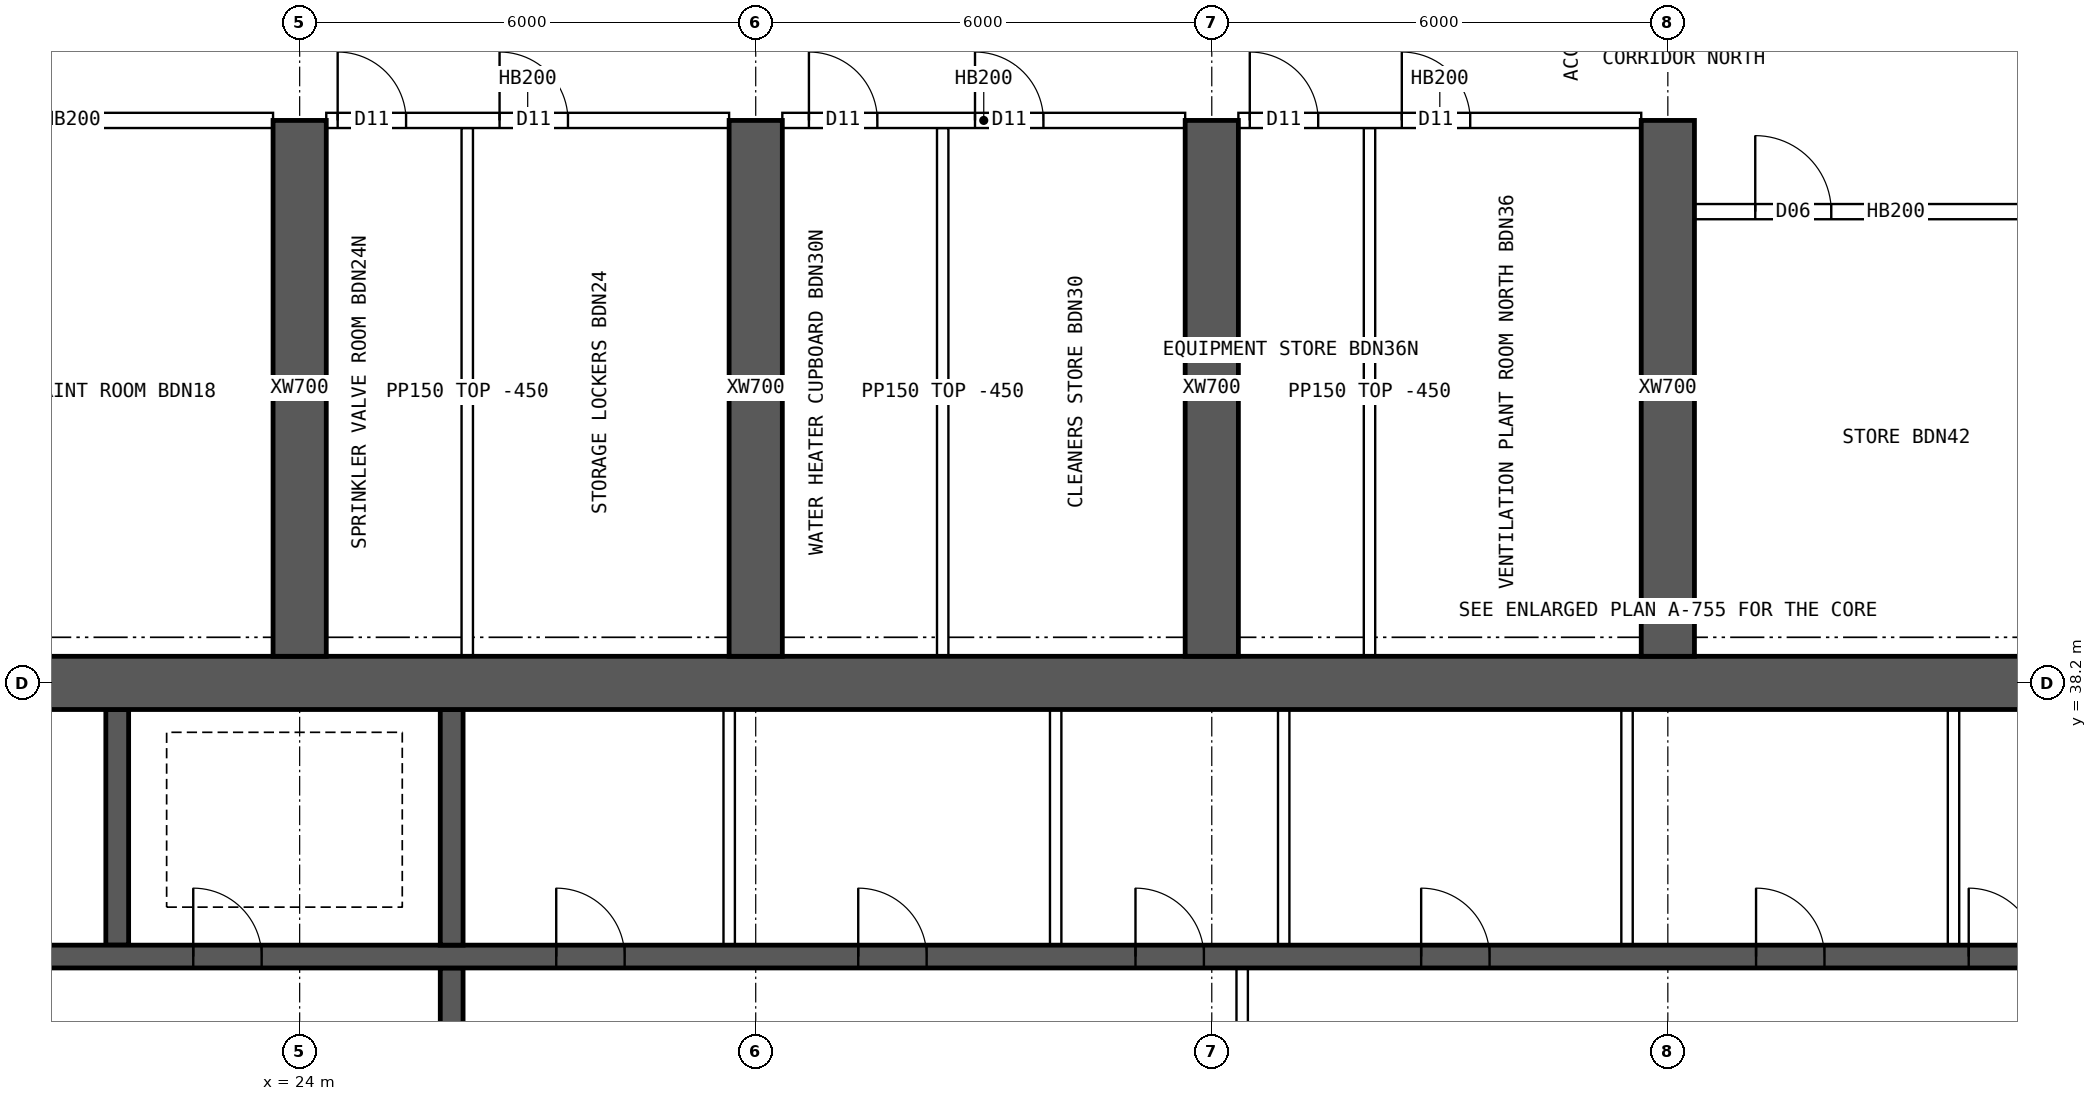
"""IFC4 building model, lengths in metres.
Left out: names, types, materials, properties, quantities, classifications, styles, units other than length and angle.
Written with IfcOpenShell. Run it as: python <this file> out.ifc"""

import sys

from ifc_helpers import new_model, si_unit, direction, frame, frame_2d, origin, place, context, subcontext, project, spatial, rectangle, extrude, element, fill, save


model = new_model("IFC4")
c1 = context("Model", 3, precision=1e-05, world=origin(), true_north=direction((0.0, 1.0)))
c2 = subcontext(c1, "Body", "Model", "MODEL_VIEW")
j1 = project(units=[si_unit("LENGTHUNIT", "METRE"), si_unit("PLANEANGLEUNIT", "RADIAN")], contexts=[c1])
p1 = place(None, origin())
s1 = spatial("IfcSite", under=j1, at=p1, CompositionType="ELEMENT")
p2 = place(p1, origin())
s2 = spatial("IfcBuilding", under=s1, at=p2, CompositionType="ELEMENT")
p3 = place(p2, frame((0.0, 0.0, 212.8)))
s3 = spatial("IfcBuildingStorey", under=s2, at=p3, CompositionType="ELEMENT", Elevation=212.8)
p4 = place(p3, frame((18.0, 38.2, 0.0), z_axis=(0.0, 0.0, 1.0), x_axis=(1.0, 0.0, 0.0)))
e1 = element("IfcWall", 1, at=p4, inside=s3, PredefinedType="SHEAR", context=c2, shape_type="SweptSolid", body=[
    extrude(rectangle(XDim=48.0, YDim=0.7, at=frame_2d((24.0, 0.0))), origin(), (0.0, 0.0, 1.0), 3.75),
])
p5 = place(p3, frame((18.35, 34.6, 0.0), z_axis=(0.0, 0.0, 1.0), x_axis=(1.0, 0.0, 0.0)))
e2 = element("IfcWall", 2, at=p5, inside=s3, PredefinedType="SHEAR", context=c2, shape_type="SweptSolid", body=[
    extrude(rectangle(XDim=47.3, YDim=0.3, at=frame_2d((23.65, 0.0))), origin(), (0.0, 0.0, 1.0), 3.75),
])
p6 = place(p5, frame((0.9, 0.0, 0.0)))
e3 = element("IfcOpeningElement", 3, at=p6, cuts=e2, PredefinedType="OPENING", context=c2, shape_type="SweptSolid", body=[
    extrude(rectangle(XDim=1.1, YDim=2.1, at=frame_2d((0.55, 1.05))), frame((0.0, 0.16, 0.0), z_axis=(0.0, -1.0, 0.0), x_axis=(1.0, 0.0, 0.0)), (0.0, 0.0, 1.0), 0.32),
])
p7 = place(p5, frame((45.3, 0.0, 0.0)))
e4 = element("IfcOpeningElement", 4, at=p7, cuts=e2, PredefinedType="OPENING", context=c2, shape_type="SweptSolid", body=[
    extrude(rectangle(XDim=1.1, YDim=2.1, at=frame_2d((0.55, 1.05))), frame((0.0, 0.16, 0.0), z_axis=(0.0, -1.0, 0.0), x_axis=(1.0, 0.0, 0.0)), (0.0, 0.0, 1.0), 0.32),
])
p8 = place(p5, frame((4.25, 0.0, 0.0)))
e5 = element("IfcOpeningElement", 5, at=p8, cuts=e2, PredefinedType="OPENING", context=c2, shape_type="SweptSolid", body=[
    extrude(rectangle(XDim=0.9, YDim=2.1, at=frame_2d((0.45, 1.05))), frame((0.0, 0.16, 0.0), z_axis=(0.0, -1.0, 0.0), x_axis=(1.0, 0.0, 0.0)), (0.0, 0.0, 1.0), 0.32),
])
p9 = place(p5, frame((42.15, 0.0, 0.0)))
e6 = element("IfcOpeningElement", 6, at=p9, cuts=e2, PredefinedType="OPENING", context=c2, shape_type="SweptSolid", body=[
    extrude(rectangle(XDim=0.9, YDim=2.1, at=frame_2d((0.45, 1.05))), frame((0.0, 0.16, 0.0), z_axis=(0.0, -1.0, 0.0), x_axis=(1.0, 0.0, 0.0)), (0.0, 0.0, 1.0), 0.32),
])
p10 = place(p5, frame((9.025, 0.0, 0.0)))
e7 = element("IfcOpeningElement", 7, at=p10, cuts=e2, PredefinedType="OPENING", context=c2, shape_type="SweptSolid", body=[
    extrude(rectangle(XDim=0.9, YDim=2.1, at=frame_2d((0.45, 1.05))), frame((0.0, 0.16, 0.0), z_axis=(0.0, -1.0, 0.0), x_axis=(1.0, 0.0, 0.0)), (0.0, 0.0, 1.0), 0.32),
])
p11 = place(p5, frame((12.999, 0.0, 0.0)))
e8 = element("IfcOpeningElement", 8, at=p11, cuts=e2, PredefinedType="OPENING", context=c2, shape_type="SweptSolid", body=[
    extrude(rectangle(XDim=0.9, YDim=2.1, at=frame_2d((0.45, 1.05))), frame((0.0, 0.16, 0.0), z_axis=(0.0, -1.0, 0.0), x_axis=(1.0, 0.0, 0.0)), (0.0, 0.0, 1.0), 0.32),
])
p12 = place(p5, frame((16.646, 0.0, 0.0)))
e9 = element("IfcOpeningElement", 9, at=p12, cuts=e2, PredefinedType="OPENING", context=c2, shape_type="SweptSolid", body=[
    extrude(rectangle(XDim=0.9, YDim=2.1, at=frame_2d((0.45, 1.05))), frame((0.0, 0.16, 0.0), z_axis=(0.0, -1.0, 0.0), x_axis=(1.0, 0.0, 0.0)), (0.0, 0.0, 1.0), 0.32),
])
p13 = place(p5, frame((20.405, 0.0, 0.0)))
e10 = element("IfcOpeningElement", 10, at=p13, cuts=e2, PredefinedType="OPENING", context=c2, shape_type="SweptSolid", body=[
    extrude(rectangle(XDim=0.9, YDim=2.1, at=frame_2d((0.45, 1.05))), frame((0.0, 0.16, 0.0), z_axis=(0.0, -1.0, 0.0), x_axis=(1.0, 0.0, 0.0)), (0.0, 0.0, 1.0), 0.32),
])
p14 = place(p5, frame((24.811, 0.0, 0.0)))
e11 = element("IfcOpeningElement", 11, at=p14, cuts=e2, PredefinedType="OPENING", context=c2, shape_type="SweptSolid", body=[
    extrude(rectangle(XDim=0.9, YDim=2.1, at=frame_2d((0.45, 1.05))), frame((0.0, 0.16, 0.0), z_axis=(0.0, -1.0, 0.0), x_axis=(1.0, 0.0, 0.0)), (0.0, 0.0, 1.0), 0.32),
])
p15 = place(p5, frame((27.608, 0.0, 0.0)))
e12 = element("IfcOpeningElement", 12, at=p15, cuts=e2, PredefinedType="OPENING", context=c2, shape_type="SweptSolid", body=[
    extrude(rectangle(XDim=0.9, YDim=2.1, at=frame_2d((0.45, 1.05))), frame((0.0, 0.16, 0.0), z_axis=(0.0, -1.0, 0.0), x_axis=(1.0, 0.0, 0.0)), (0.0, 0.0, 1.0), 0.32),
])
p16 = place(p5, frame((29.981, 0.0, 0.0)))
e13 = element("IfcOpeningElement", 13, at=p16, cuts=e2, PredefinedType="OPENING", context=c2, shape_type="SweptSolid", body=[
    extrude(rectangle(XDim=0.9, YDim=2.1, at=frame_2d((0.45, 1.05))), frame((0.0, 0.16, 0.0), z_axis=(0.0, -1.0, 0.0), x_axis=(1.0, 0.0, 0.0)), (0.0, 0.0, 1.0), 0.32),
])
p17 = place(p5, frame((33.831, 0.0, 0.0)))
e14 = element("IfcOpeningElement", 14, at=p17, cuts=e2, PredefinedType="OPENING", context=c2, shape_type="SweptSolid", body=[
    extrude(rectangle(XDim=0.9, YDim=2.1, at=frame_2d((0.45, 1.05))), frame((0.0, 0.16, 0.0), z_axis=(0.0, -1.0, 0.0), x_axis=(1.0, 0.0, 0.0)), (0.0, 0.0, 1.0), 0.32),
])
p18 = place(p5, frame((37.579, 0.0, 0.0)))
e15 = element("IfcOpeningElement", 15, at=p18, cuts=e2, PredefinedType="OPENING", context=c2, shape_type="SweptSolid", body=[
    extrude(rectangle(XDim=0.9, YDim=2.1, at=frame_2d((0.45, 1.05))), frame((0.0, 0.16, 0.0), z_axis=(0.0, -1.0, 0.0), x_axis=(1.0, 0.0, 0.0)), (0.0, 0.0, 1.0), 0.32),
])
p19 = place(p3, frame((26.0, 30.55, 0.0), z_axis=(0.0, 0.0, 1.0), x_axis=(0.0, 1.0, 0.0)))
e16 = element("IfcWall", 16, at=p19, inside=s3, PredefinedType="SHEAR", context=c2, shape_type="SweptSolid", body=[
    extrude(rectangle(XDim=3.9, YDim=0.3, at=frame_2d((1.95, 0.0))), origin(), (0.0, 0.0, 1.0), 3.75),
])
p20 = place(p19, frame((1.4, 0.0, 0.0)))
e17 = element("IfcOpeningElement", 17, at=p20, cuts=e16, PredefinedType="OPENING", context=c2, shape_type="SweptSolid", body=[
    extrude(rectangle(XDim=1.2, YDim=2.1, at=frame_2d((0.6, 1.05))), frame((0.0, 0.16, 0.0), z_axis=(0.0, -1.0, 0.0), x_axis=(1.0, 0.0, 0.0)), (0.0, 0.0, 1.0), 0.32),
])
for number, where, z_axis, x_axis in (
    (18, (21.6, 34.75, 0.0), (0.0, 0.0, 1.0), (0.0, 1.0, 0.0)),
    (19, (26.0, 34.75, 0.0), (0.0, 0.0, 1.0), (0.0, 1.0, 0.0)),
):
    element("IfcWall", number, at=place(p3, frame(where, z_axis=z_axis, x_axis=x_axis)), inside=s3, PredefinedType="SHEAR", context=c2, shape_type="SweptSolid", body=[
        extrude(rectangle(XDim=3.1, YDim=0.3, at=frame_2d((1.55, 0.0))), origin(), (0.0, 0.0, 1.0), 3.75),
    ])
for number, where, z_axis, x_axis in (
    (20, (24.0, 38.55, 0.0), (0.0, 0.0, 1.0), (0.0, 1.0, 0.0)),
    (21, (30.0, 38.55, 0.0), (0.0, 0.0, 1.0), (0.0, 1.0, 0.0)),
    (22, (36.0, 38.55, 0.0), (0.0, 0.0, 1.0), (0.0, 1.0, 0.0)),
    (23, (42.0, 38.55, 0.0), (0.0, 0.0, 1.0), (0.0, 1.0, 0.0)),
):
    element("IfcWall", number, at=place(p3, frame(where, z_axis=z_axis, x_axis=x_axis)), inside=s3, PredefinedType="SHEAR", context=c2, shape_type="SweptSolid", body=[
        extrude(rectangle(XDim=7.05, YDim=0.7, at=frame_2d((3.525, 0.0))), origin(), (0.0, 0.0, 1.0), 3.75),
    ])
p21 = place(p3, frame((36.4, 30.55, 0.0), z_axis=(0.0, 0.0, 1.0), x_axis=(0.0, 1.0, 0.0)))
e24 = element("IfcWall", 24, at=p21, inside=s3, PredefinedType="SOLIDWALL", context=c2, shape_type="SweptSolid", body=[
    extrude(rectangle(XDim=3.9, YDim=0.15, at=frame_2d((1.95, 0.0))), origin(), (0.0, 0.0, 1.0), 3.3),
])
p22 = place(p21, frame((1.15, 0.0, 0.0)))
e25 = element("IfcOpeningElement", 25, at=p22, cuts=e24, PredefinedType="OPENING", context=c2, shape_type="SweptSolid", body=[
    extrude(rectangle(XDim=1.6, YDim=2.1, at=frame_2d((0.8, 1.05))), frame((0.0, 0.085, 0.0), z_axis=(0.0, -1.0, 0.0), x_axis=(1.0, 0.0, 0.0)), (0.0, 0.0, 1.0), 0.17),
])
for number, where, z_axis, x_axis in (
    (26, (29.651, 34.75, 0.0), (0.0, 0.0, 1.0), (0.0, 1.0, 0.0)),
    (27, (33.946, 34.75, 0.0), (0.0, 0.0, 1.0), (0.0, 1.0, 0.0)),
    (28, (36.946, 34.75, 0.0), (0.0, 0.0, 1.0), (0.0, 1.0, 0.0)),
    (29, (41.463, 34.75, 0.0), (0.0, 0.0, 1.0), (0.0, 1.0, 0.0)),
    (30, (45.758, 34.75, 0.0), (0.0, 0.0, 1.0), (0.0, 1.0, 0.0)),
):
    element("IfcWall", number, at=place(p3, frame(where, z_axis=z_axis, x_axis=x_axis)), inside=s3, PredefinedType="SOLIDWALL", context=c2, shape_type="SweptSolid", body=[
        extrude(rectangle(XDim=3.1, YDim=0.15, at=frame_2d((1.55, 0.0))), origin(), (0.0, 0.0, 1.0), 3.3),
    ])
p23 = place(p3, frame((18.35, 45.6, 0.0), z_axis=(0.0, 0.0, 1.0), x_axis=(1.0, 0.0, 0.0)))
e31 = element("IfcWall", 31, at=p23, inside=s3, PredefinedType="SOLIDWALL", context=c2, shape_type="SweptSolid", body=[
    extrude(rectangle(XDim=5.3, YDim=0.2, at=frame_2d((2.65, 0.0))), origin(), (0.0, 0.0, 1.0), 3.3),
])
p24 = place(p23, frame((0.8, 0.0, 0.0)))
e32 = element("IfcOpeningElement", 32, at=p24, cuts=e31, PredefinedType="OPENING", context=c2, shape_type="SweptSolid", body=[
    extrude(rectangle(XDim=1.0, YDim=2.1, at=frame_2d((0.5, 1.05))), frame((0.0, 0.11, 0.0), z_axis=(0.0, -1.0, 0.0), x_axis=(1.0, 0.0, 0.0)), (0.0, 0.0, 1.0), 0.22),
])
p25 = place(p3, frame((24.35, 45.6, 0.0), z_axis=(0.0, 0.0, 1.0), x_axis=(1.0, 0.0, 0.0)))
e33 = element("IfcWall", 33, at=p25, inside=s3, PredefinedType="SOLIDWALL", context=c2, shape_type="SweptSolid", body=[
    extrude(rectangle(XDim=5.3, YDim=0.2, at=frame_2d((2.65, 0.0))), origin(), (0.0, 0.0, 1.0), 3.3),
])
p26 = place(p25, frame((0.15, 0.0, 0.0)))
e34 = element("IfcOpeningElement", 34, at=p26, cuts=e33, PredefinedType="OPENING", context=c2, shape_type="SweptSolid", body=[
    extrude(rectangle(XDim=0.9, YDim=2.1, at=frame_2d((0.45, 1.05))), frame((0.0, 0.11, 0.0), z_axis=(0.0, -1.0, 0.0), x_axis=(1.0, 0.0, 0.0)), (0.0, 0.0, 1.0), 0.22),
])
p27 = place(p25, frame((2.28, 0.0, 0.0)))
e35 = element("IfcOpeningElement", 35, at=p27, cuts=e33, PredefinedType="OPENING", context=c2, shape_type="SweptSolid", body=[
    extrude(rectangle(XDim=0.9, YDim=2.1, at=frame_2d((0.45, 1.05))), frame((0.0, 0.11, 0.0), z_axis=(0.0, -1.0, 0.0), x_axis=(1.0, 0.0, 0.0)), (0.0, 0.0, 1.0), 0.22),
])
p28 = place(p3, frame((30.35, 45.6, 0.0), z_axis=(0.0, 0.0, 1.0), x_axis=(1.0, 0.0, 0.0)))
e36 = element("IfcWall", 36, at=p28, inside=s3, PredefinedType="SOLIDWALL", context=c2, shape_type="SweptSolid", body=[
    extrude(rectangle(XDim=5.3, YDim=0.2, at=frame_2d((2.65, 0.0))), origin(), (0.0, 0.0, 1.0), 3.3),
])
p29 = place(p28, frame((0.35, 0.0, 0.0)))
e37 = element("IfcOpeningElement", 37, at=p29, cuts=e36, PredefinedType="OPENING", context=c2, shape_type="SweptSolid", body=[
    extrude(rectangle(XDim=0.9, YDim=2.1, at=frame_2d((0.45, 1.05))), frame((0.0, 0.11, 0.0), z_axis=(0.0, -1.0, 0.0), x_axis=(1.0, 0.0, 0.0)), (0.0, 0.0, 1.0), 0.22),
])
p30 = place(p28, frame((2.535, 0.0, 0.0)))
e38 = element("IfcOpeningElement", 38, at=p30, cuts=e36, PredefinedType="OPENING", context=c2, shape_type="SweptSolid", body=[
    extrude(rectangle(XDim=0.9, YDim=2.1, at=frame_2d((0.45, 1.05))), frame((0.0, 0.11, 0.0), z_axis=(0.0, -1.0, 0.0), x_axis=(1.0, 0.0, 0.0)), (0.0, 0.0, 1.0), 0.22),
])
p31 = place(p3, frame((36.35, 45.6, 0.0), z_axis=(0.0, 0.0, 1.0), x_axis=(1.0, 0.0, 0.0)))
e39 = element("IfcWall", 39, at=p31, inside=s3, PredefinedType="SOLIDWALL", context=c2, shape_type="SweptSolid", body=[
    extrude(rectangle(XDim=5.3, YDim=0.2, at=frame_2d((2.65, 0.0))), origin(), (0.0, 0.0, 1.0), 3.3),
])
p32 = place(p31, frame((0.15, 0.0, 0.0)))
e40 = element("IfcOpeningElement", 40, at=p32, cuts=e39, PredefinedType="OPENING", context=c2, shape_type="SweptSolid", body=[
    extrude(rectangle(XDim=0.9, YDim=2.1, at=frame_2d((0.45, 1.05))), frame((0.0, 0.11, 0.0), z_axis=(0.0, -1.0, 0.0), x_axis=(1.0, 0.0, 0.0)), (0.0, 0.0, 1.0), 0.22),
])
p33 = place(p31, frame((2.15, 0.0, 0.0)))
e41 = element("IfcOpeningElement", 41, at=p33, cuts=e39, PredefinedType="OPENING", context=c2, shape_type="SweptSolid", body=[
    extrude(rectangle(XDim=0.9, YDim=2.1, at=frame_2d((0.45, 1.05))), frame((0.0, 0.11, 0.0), z_axis=(0.0, -1.0, 0.0), x_axis=(1.0, 0.0, 0.0)), (0.0, 0.0, 1.0), 0.22),
])
for number, where, z_axis, x_axis in (
    (42, (26.205, 38.55, 0.0), (0.0, 0.0, 1.0), (0.0, 1.0, 0.0)),
    (43, (32.46, 38.55, 0.0), (0.0, 0.0, 1.0), (0.0, 1.0, 0.0)),
    (44, (38.075, 38.55, 0.0), (0.0, 0.0, 1.0), (0.0, 1.0, 0.0)),
):
    element("IfcWall", number, at=place(p3, frame(where, z_axis=z_axis, x_axis=x_axis)), inside=s3, PredefinedType="PARTITIONING", context=c2, shape_type="SweptSolid", body=[
        extrude(rectangle(XDim=6.95, YDim=0.15, at=frame_2d((3.475, 0.0))), origin(), (0.0, 0.0, 1.0), 3.3),
    ])
p34 = place(p3, frame((42.35, 44.4, 0.0), z_axis=(0.0, 0.0, 1.0), x_axis=(1.0, 0.0, 0.0)))
e45 = element("IfcWall", 45, at=p34, inside=s3, PredefinedType="SOLIDWALL", context=c2, shape_type="SweptSolid", body=[
    extrude(rectangle(XDim=5.3, YDim=0.2, at=frame_2d((2.65, 0.0))), origin(), (0.0, 0.0, 1.0), 3.3),
])
p35 = place(p34, frame((0.8, 0.0, 0.0)))
e46 = element("IfcOpeningElement", 46, at=p35, cuts=e45, PredefinedType="OPENING", context=c2, shape_type="SweptSolid", body=[
    extrude(rectangle(XDim=1.0, YDim=2.1, at=frame_2d((0.5, 1.05))), frame((0.0, 0.11, 0.0), z_axis=(0.0, -1.0, 0.0), x_axis=(1.0, 0.0, 0.0)), (0.0, 0.0, 1.0), 0.22),
])
p36 = place(p8, origin())
e47 = element("IfcDoor", 47, at=p36, inside=s3, OperationType="SINGLE_SWING_LEFT", PredefinedType="DOOR", context=c2, shape_type="SweptSolid", body=[
    extrude(rectangle(XDim=0.9, YDim=2.1, at=frame_2d((0.45, 1.05))), frame((0.0, 0.025, 0.0), z_axis=(0.0, -1.0, 0.0), x_axis=(1.0, 0.0, 0.0)), (0.0, 0.0, 1.0), 0.05),
])
fill(e5, e47)
p37 = place(p10, origin())
e48 = element("IfcDoor", 48, at=p37, inside=s3, OperationType="SINGLE_SWING_LEFT", PredefinedType="DOOR", context=c2, shape_type="SweptSolid", body=[
    extrude(rectangle(XDim=0.9, YDim=2.1, at=frame_2d((0.45, 1.05))), frame((0.0, 0.025, 0.0), z_axis=(0.0, -1.0, 0.0), x_axis=(1.0, 0.0, 0.0)), (0.0, 0.0, 1.0), 0.05),
])
fill(e7, e48)
p38 = place(p11, origin())
e49 = element("IfcDoor", 49, at=p38, inside=s3, OperationType="SINGLE_SWING_LEFT", PredefinedType="DOOR", context=c2, shape_type="SweptSolid", body=[
    extrude(rectangle(XDim=0.9, YDim=2.1, at=frame_2d((0.45, 1.05))), frame((0.0, 0.025, 0.0), z_axis=(0.0, -1.0, 0.0), x_axis=(1.0, 0.0, 0.0)), (0.0, 0.0, 1.0), 0.05),
])
fill(e8, e49)
p39 = place(p12, origin())
e50 = element("IfcDoor", 50, at=p39, inside=s3, OperationType="SINGLE_SWING_LEFT", PredefinedType="DOOR", context=c2, shape_type="SweptSolid", body=[
    extrude(rectangle(XDim=0.9, YDim=2.1, at=frame_2d((0.45, 1.05))), frame((0.0, 0.025, 0.0), z_axis=(0.0, -1.0, 0.0), x_axis=(1.0, 0.0, 0.0)), (0.0, 0.0, 1.0), 0.05),
])
fill(e9, e50)
p40 = place(p13, origin())
e51 = element("IfcDoor", 51, at=p40, inside=s3, OperationType="SINGLE_SWING_LEFT", PredefinedType="DOOR", context=c2, shape_type="SweptSolid", body=[
    extrude(rectangle(XDim=0.9, YDim=2.1, at=frame_2d((0.45, 1.05))), frame((0.0, 0.025, 0.0), z_axis=(0.0, -1.0, 0.0), x_axis=(1.0, 0.0, 0.0)), (0.0, 0.0, 1.0), 0.05),
])
fill(e10, e51)
p41 = place(p14, origin())
e52 = element("IfcDoor", 52, at=p41, inside=s3, OperationType="SINGLE_SWING_LEFT", PredefinedType="DOOR", context=c2, shape_type="SweptSolid", body=[
    extrude(rectangle(XDim=0.9, YDim=2.1, at=frame_2d((0.45, 1.05))), frame((0.0, 0.025, 0.0), z_axis=(0.0, -1.0, 0.0), x_axis=(1.0, 0.0, 0.0)), (0.0, 0.0, 1.0), 0.05),
])
fill(e11, e52)
p42 = place(p15, origin())
e53 = element("IfcDoor", 53, at=p42, inside=s3, OperationType="SINGLE_SWING_LEFT", PredefinedType="DOOR", context=c2, shape_type="SweptSolid", body=[
    extrude(rectangle(XDim=0.9, YDim=2.1, at=frame_2d((0.45, 1.05))), frame((0.0, 0.025, 0.0), z_axis=(0.0, -1.0, 0.0), x_axis=(1.0, 0.0, 0.0)), (0.0, 0.0, 1.0), 0.05),
])
fill(e12, e53)
p43 = place(p26, origin())
e54 = element("IfcDoor", 54, at=p43, inside=s3, OperationType="SINGLE_SWING_LEFT", PredefinedType="DOOR", context=c2, shape_type="SweptSolid", body=[
    extrude(rectangle(XDim=0.9, YDim=2.1, at=frame_2d((0.45, 1.05))), frame((0.0, 0.025, 0.0), z_axis=(0.0, -1.0, 0.0), x_axis=(1.0, 0.0, 0.0)), (0.0, 0.0, 1.0), 0.05),
])
fill(e34, e54)
p44 = place(p27, origin())
e55 = element("IfcDoor", 55, at=p44, inside=s3, OperationType="SINGLE_SWING_LEFT", PredefinedType="DOOR", context=c2, shape_type="SweptSolid", body=[
    extrude(rectangle(XDim=0.9, YDim=2.1, at=frame_2d((0.45, 1.05))), frame((0.0, 0.025, 0.0), z_axis=(0.0, -1.0, 0.0), x_axis=(1.0, 0.0, 0.0)), (0.0, 0.0, 1.0), 0.05),
])
fill(e35, e55)
p45 = place(p29, origin())
e56 = element("IfcDoor", 56, at=p45, inside=s3, OperationType="SINGLE_SWING_LEFT", PredefinedType="DOOR", context=c2, shape_type="SweptSolid", body=[
    extrude(rectangle(XDim=0.9, YDim=2.1, at=frame_2d((0.45, 1.05))), frame((0.0, 0.025, 0.0), z_axis=(0.0, -1.0, 0.0), x_axis=(1.0, 0.0, 0.0)), (0.0, 0.0, 1.0), 0.05),
])
fill(e37, e56)
p46 = place(p30, origin())
e57 = element("IfcDoor", 57, at=p46, inside=s3, OperationType="SINGLE_SWING_LEFT", PredefinedType="DOOR", context=c2, shape_type="SweptSolid", body=[
    extrude(rectangle(XDim=0.9, YDim=2.1, at=frame_2d((0.45, 1.05))), frame((0.0, 0.025, 0.0), z_axis=(0.0, -1.0, 0.0), x_axis=(1.0, 0.0, 0.0)), (0.0, 0.0, 1.0), 0.05),
])
fill(e38, e57)
p47 = place(p32, origin())
e58 = element("IfcDoor", 58, at=p47, inside=s3, OperationType="SINGLE_SWING_LEFT", PredefinedType="DOOR", context=c2, shape_type="SweptSolid", body=[
    extrude(rectangle(XDim=0.9, YDim=2.1, at=frame_2d((0.45, 1.05))), frame((0.0, 0.025, 0.0), z_axis=(0.0, -1.0, 0.0), x_axis=(1.0, 0.0, 0.0)), (0.0, 0.0, 1.0), 0.05),
])
fill(e40, e58)
p48 = place(p33, origin())
e59 = element("IfcDoor", 59, at=p48, inside=s3, OperationType="SINGLE_SWING_LEFT", PredefinedType="DOOR", context=c2, shape_type="SweptSolid", body=[
    extrude(rectangle(XDim=0.9, YDim=2.1, at=frame_2d((0.45, 1.05))), frame((0.0, 0.025, 0.0), z_axis=(0.0, -1.0, 0.0), x_axis=(1.0, 0.0, 0.0)), (0.0, 0.0, 1.0), 0.05),
])
fill(e41, e59)
p49 = place(p35, origin())
e60 = element("IfcDoor", 60, at=p49, inside=s3, OperationType="SINGLE_SWING_LEFT", PredefinedType="DOOR", context=c2, shape_type="SweptSolid", body=[
    extrude(rectangle(XDim=1.0, YDim=2.1, at=frame_2d((0.5, 1.05))), frame((0.0, 0.025, 0.0), z_axis=(0.0, -1.0, 0.0), x_axis=(1.0, 0.0, 0.0)), (0.0, 0.0, 1.0), 0.05),
])
fill(e46, e60)
save(model, sys.argv[1])
